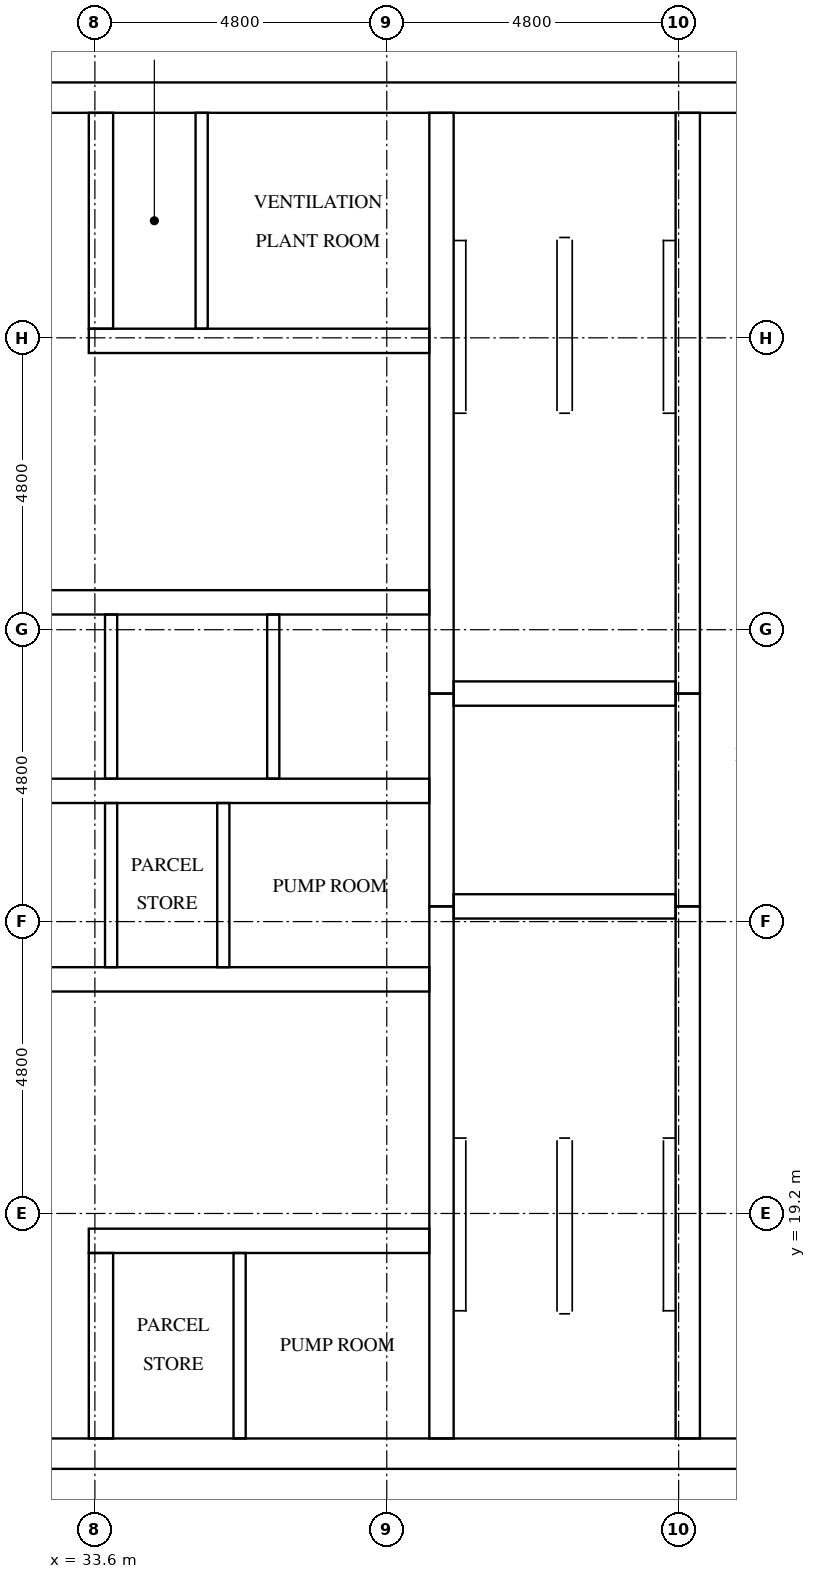
"""IFC4 building model, lengths in metres.
Left out: names, types, materials, properties, quantities, classifications, styles, units other than length and angle.
Written with IfcOpenShell. Run it as: python <this file> out.ifc"""

import sys

from ifc_helpers import new_model, si_unit, direction, frame, frame_2d, origin, place, context, subcontext, project, spatial, rectangle, extrude, element, fill, save


model = new_model("IFC4")
c1 = context("Model", 3, precision=1e-05, world=origin(), true_north=direction((0.0, 1.0)))
c2 = subcontext(c1, "Body", "Model", "MODEL_VIEW")
j1 = project(units=[si_unit("LENGTHUNIT", "METRE"), si_unit("PLANEANGLEUNIT", "RADIAN")], contexts=[c1])
p1 = place(None, origin())
s1 = spatial("IfcSite", under=j1, at=p1, CompositionType="ELEMENT")
p2 = place(p1, origin())
s2 = spatial("IfcBuilding", under=s1, at=p2, CompositionType="ELEMENT")
p3 = place(p2, frame((0.0, 0.0, 268.6)))
s3 = spatial("IfcBuildingStorey", under=s2, at=p3, CompositionType="ELEMENT", Elevation=268.6)
p4 = place(p3, frame((15.0, 15.25, 0.0), z_axis=(0.0, 0.0, 1.0), x_axis=(1.0, 0.0, 0.0)))
e1 = element("IfcWall", 1, at=p4, inside=s3, PredefinedType="SHEAR", context=c2, shape_type="SweptSolid", body=[
    extrude(rectangle(XDim=32.4, YDim=0.5, at=frame_2d((16.2, 0.0))), origin(), (0.0, 0.0, 1.0), 3.2),
])
p5 = place(p4, frame((15.3, 0.0, 0.0)))
e2 = element("IfcOpeningElement", 2, at=p5, cuts=e1, PredefinedType="OPENING", context=c2, shape_type="SweptSolid", body=[
    extrude(rectangle(XDim=1.8, YDim=2.1, at=frame_2d((0.9, 1.05))), frame((0.0, 0.26, 0.0), z_axis=(0.0, -1.0, 0.0), x_axis=(1.0, 0.0, 0.0)), (0.0, 0.0, 1.0), 0.52),
])
p6 = place(p3, frame((15.0, 37.55, 0.0), z_axis=(0.0, 0.0, 1.0), x_axis=(1.0, 0.0, 0.0)))
e3 = element("IfcWall", 3, at=p6, inside=s3, PredefinedType="SHEAR", context=c2, shape_type="SweptSolid", body=[
    extrude(rectangle(XDim=32.4, YDim=0.5, at=frame_2d((16.2, 0.0))), origin(), (0.0, 0.0, 1.0), 3.2),
])
p7 = place(p6, frame((15.3, 0.0, 0.0)))
e4 = element("IfcOpeningElement", 4, at=p7, cuts=e3, PredefinedType="OPENING", context=c2, shape_type="SweptSolid", body=[
    extrude(rectangle(XDim=1.8, YDim=2.1, at=frame_2d((0.9, 1.05))), frame((0.0, 0.26, 0.0), z_axis=(0.0, -1.0, 0.0), x_axis=(1.0, 0.0, 0.0)), (0.0, 0.0, 1.0), 0.52),
])
p8 = place(p6, frame((1.282, 0.0, 0.0)))
e5 = element("IfcOpeningElement", 5, at=p8, cuts=e3, PredefinedType="OPENING", context=c2, shape_type="SweptSolid", body=[
    extrude(rectangle(XDim=1.0, YDim=2.1, at=frame_2d((0.5, 1.05))), frame((0.0, 0.26, 0.0), z_axis=(0.0, -1.0, 0.0), x_axis=(1.0, 0.0, 0.0)), (0.0, 0.0, 1.0), 0.52),
])
p9 = place(p6, frame((5.082, 0.0, 0.0)))
e6 = element("IfcOpeningElement", 6, at=p9, cuts=e3, PredefinedType="OPENING", context=c2, shape_type="SweptSolid", body=[
    extrude(rectangle(XDim=1.0, YDim=2.1, at=frame_2d((0.5, 1.05))), frame((0.0, 0.26, 0.0), z_axis=(0.0, -1.0, 0.0), x_axis=(1.0, 0.0, 0.0)), (0.0, 0.0, 1.0), 0.52),
])
p10 = place(p3, frame((39.3, 15.5, 0.0), z_axis=(0.0, 0.0, 1.0), x_axis=(0.0, 1.0, 0.0)))
e7 = element("IfcWall", 7, at=p10, inside=s3, PredefinedType="SHEAR", context=c2, shape_type="SweptSolid", body=[
    extrude(rectangle(XDim=8.75, YDim=0.4, at=frame_2d((4.375, 0.0))), origin(), (0.0, 0.0, 1.0), 3.2),
])
p11 = place(p3, frame((39.3, 24.25, 0.0), z_axis=(0.0, 0.0, 1.0), x_axis=(0.0, 1.0, 0.0)))
e8 = element("IfcWall", 8, at=p11, inside=s3, PredefinedType="SHEAR", context=c2, shape_type="SweptSolid", body=[
    extrude(rectangle(XDim=3.5, YDim=0.4, at=frame_2d((1.75, 0.0))), origin(), (0.0, 0.0, 1.0), 3.2),
])
p12 = place(p3, frame((39.3, 27.75, 0.0), z_axis=(0.0, 0.0, 1.0), x_axis=(0.0, 1.0, 0.0)))
e9 = element("IfcWall", 9, at=p12, inside=s3, PredefinedType="SHEAR", context=c2, shape_type="SweptSolid", body=[
    extrude(rectangle(XDim=9.55, YDim=0.4, at=frame_2d((4.775, 0.0))), origin(), (0.0, 0.0, 1.0), 3.2),
])
p13 = place(p3, frame((43.35, 15.5, 0.0), z_axis=(0.0, 0.0, 1.0), x_axis=(0.0, 1.0, 0.0)))
e10 = element("IfcWall", 10, at=p13, inside=s3, PredefinedType="SHEAR", context=c2, shape_type="SweptSolid", body=[
    extrude(rectangle(XDim=8.75, YDim=0.4, at=frame_2d((4.375, 0.0))), origin(), (0.0, 0.0, 1.0), 3.2),
])
p14 = place(p13, frame((0.7, 0.0, 0.0)))
e11 = element("IfcOpeningElement", 11, at=p14, cuts=e10, PredefinedType="OPENING", context=c2, shape_type="SweptSolid", body=[
    extrude(rectangle(XDim=1.2, YDim=2.1, at=frame_2d((0.6, 1.05))), frame((0.0, 0.21, 0.0), z_axis=(0.0, -1.0, 0.0), x_axis=(1.0, 0.0, 0.0)), (0.0, 0.0, 1.0), 0.42),
])
p15 = place(p3, frame((43.35, 24.25, 0.0), z_axis=(0.0, 0.0, 1.0), x_axis=(0.0, 1.0, 0.0)))
e12 = element("IfcWall", 12, at=p15, inside=s3, PredefinedType="SHEAR", context=c2, shape_type="SweptSolid", body=[
    extrude(rectangle(XDim=3.5, YDim=0.4, at=frame_2d((1.75, 0.0))), origin(), (0.0, 0.0, 1.0), 3.2),
])
p16 = place(p15, frame((1.2, 0.0, 0.0)))
e13 = element("IfcOpeningElement", 13, at=p16, cuts=e12, PredefinedType="OPENING", context=c2, shape_type="SweptSolid", body=[
    extrude(rectangle(XDim=1.1, YDim=2.1, at=frame_2d((0.55, 1.05))), frame((0.0, 0.21, 0.0), z_axis=(0.0, -1.0, 0.0), x_axis=(1.0, 0.0, 0.0)), (0.0, 0.0, 1.0), 0.42),
])
p17 = place(p3, frame((43.35, 27.75, 0.0), z_axis=(0.0, 0.0, 1.0), x_axis=(0.0, 1.0, 0.0)))
e14 = element("IfcWall", 14, at=p17, inside=s3, PredefinedType="SHEAR", context=c2, shape_type="SweptSolid", body=[
    extrude(rectangle(XDim=9.55, YDim=0.4, at=frame_2d((4.775, 0.0))), origin(), (0.0, 0.0, 1.0), 3.2),
])
p18 = place(p17, frame((7.65, 0.0, 0.0)))
e15 = element("IfcOpeningElement", 15, at=p18, cuts=e14, PredefinedType="OPENING", context=c2, shape_type="SweptSolid", body=[
    extrude(rectangle(XDim=1.2, YDim=2.1, at=frame_2d((0.6, 1.05))), frame((0.0, 0.21, 0.0), z_axis=(0.0, -1.0, 0.0), x_axis=(1.0, 0.0, 0.0)), (0.0, 0.0, 1.0), 0.42),
])
for number, where, z_axis, x_axis in (
    (16, (39.5, 24.25, 0.0), (0.0, 0.0, 1.0), (1.0, 0.0, 0.0)),
    (17, (39.5, 27.75, 0.0), (0.0, 0.0, 1.0), (1.0, 0.0, 0.0)),
):
    element("IfcWall", number, at=place(p3, frame(where, z_axis=z_axis, x_axis=x_axis)), inside=s3, PredefinedType="SHEAR", context=c2, shape_type="SweptSolid", body=[
        extrude(rectangle(XDim=3.65, YDim=0.4, at=frame_2d((1.825, 0.0))), origin(), (0.0, 0.0, 1.0), 3.2),
    ])
p19 = place(p3, frame((33.5, 18.75, 0.0), z_axis=(0.0, 0.0, 1.0), x_axis=(1.0, 0.0, 0.0)))
e18 = element("IfcWall", 18, at=p19, inside=s3, PredefinedType="SHEAR", context=c2, shape_type="SweptSolid", body=[
    extrude(rectangle(XDim=5.6, YDim=0.4, at=frame_2d((2.8, 0.0))), origin(), (0.0, 0.0, 1.0), 3.2),
])
p20 = place(p19, frame((0.89, 0.0, 0.0)))
e19 = element("IfcOpeningElement", 19, at=p20, cuts=e18, PredefinedType="OPENING", context=c2, shape_type="SweptSolid", body=[
    extrude(rectangle(XDim=1.0, YDim=2.1, at=frame_2d((0.5, 1.05))), frame((0.0, 0.21, 0.0), z_axis=(0.0, -1.0, 0.0), x_axis=(1.0, 0.0, 0.0)), (0.0, 0.0, 1.0), 0.42),
])
p21 = place(p19, frame((3.59, 0.0, 0.0)))
e20 = element("IfcOpeningElement", 20, at=p21, cuts=e18, PredefinedType="OPENING", context=c2, shape_type="SweptSolid", body=[
    extrude(rectangle(XDim=1.0, YDim=2.1, at=frame_2d((0.5, 1.05))), frame((0.0, 0.21, 0.0), z_axis=(0.0, -1.0, 0.0), x_axis=(1.0, 0.0, 0.0)), (0.0, 0.0, 1.0), 0.42),
])
p22 = place(p3, frame((23.3, 23.05, 0.0), z_axis=(0.0, 0.0, 1.0), x_axis=(1.0, 0.0, 0.0)))
e21 = element("IfcWall", 21, at=p22, inside=s3, PredefinedType="SHEAR", context=c2, shape_type="SweptSolid", body=[
    extrude(rectangle(XDim=15.8, YDim=0.4, at=frame_2d((7.9, 0.0))), origin(), (0.0, 0.0, 1.0), 3.2),
])
p23 = place(p22, frame((0.323, 0.0, 0.0)))
e22 = element("IfcOpeningElement", 22, at=p23, cuts=e21, PredefinedType="OPENING", context=c2, shape_type="SweptSolid", body=[
    extrude(rectangle(XDim=1.0, YDim=2.1, at=frame_2d((0.5, 1.05))), frame((0.0, 0.21, 0.0), z_axis=(0.0, -1.0, 0.0), x_axis=(1.0, 0.0, 0.0)), (0.0, 0.0, 1.0), 0.42),
])
p24 = place(p22, frame((2.989, 0.0, 0.0)))
e23 = element("IfcOpeningElement", 23, at=p24, cuts=e21, PredefinedType="OPENING", context=c2, shape_type="SweptSolid", body=[
    extrude(rectangle(XDim=1.0, YDim=2.1, at=frame_2d((0.5, 1.05))), frame((0.0, 0.21, 0.0), z_axis=(0.0, -1.0, 0.0), x_axis=(1.0, 0.0, 0.0)), (0.0, 0.0, 1.0), 0.42),
])
p25 = place(p22, frame((10.989, 0.0, 0.0)))
e24 = element("IfcOpeningElement", 24, at=p25, cuts=e21, PredefinedType="OPENING", context=c2, shape_type="SweptSolid", body=[
    extrude(rectangle(XDim=1.0, YDim=2.1, at=frame_2d((0.5, 1.05))), frame((0.0, 0.21, 0.0), z_axis=(0.0, -1.0, 0.0), x_axis=(1.0, 0.0, 0.0)), (0.0, 0.0, 1.0), 0.42),
])
p26 = place(p22, frame((13.656, 0.0, 0.0)))
e25 = element("IfcOpeningElement", 25, at=p26, cuts=e21, PredefinedType="OPENING", context=c2, shape_type="SweptSolid", body=[
    extrude(rectangle(XDim=1.0, YDim=2.1, at=frame_2d((0.5, 1.05))), frame((0.0, 0.21, 0.0), z_axis=(0.0, -1.0, 0.0), x_axis=(1.0, 0.0, 0.0)), (0.0, 0.0, 1.0), 0.42),
])
p27 = place(p3, frame((23.3, 26.15, 0.0), z_axis=(0.0, 0.0, 1.0), x_axis=(1.0, 0.0, 0.0)))
e26 = element("IfcWall", 26, at=p27, inside=s3, PredefinedType="SHEAR", context=c2, shape_type="SweptSolid", body=[
    extrude(rectangle(XDim=15.8, YDim=0.4, at=frame_2d((7.9, 0.0))), origin(), (0.0, 0.0, 1.0), 3.2),
])
p28 = place(p3, frame((23.3, 29.25, 0.0), z_axis=(0.0, 0.0, 1.0), x_axis=(1.0, 0.0, 0.0)))
e27 = element("IfcWall", 27, at=p28, inside=s3, PredefinedType="SHEAR", context=c2, shape_type="SweptSolid", body=[
    extrude(rectangle(XDim=15.8, YDim=0.4, at=frame_2d((7.9, 0.0))), origin(), (0.0, 0.0, 1.0), 3.2),
])
p29 = place(p28, frame((0.683, 0.0, 0.0)))
e28 = element("IfcOpeningElement", 28, at=p29, cuts=e27, PredefinedType="OPENING", context=c2, shape_type="SweptSolid", body=[
    extrude(rectangle(XDim=1.1, YDim=2.1, at=frame_2d((0.55, 1.05))), frame((0.0, 0.21, 0.0), z_axis=(0.0, -1.0, 0.0), x_axis=(1.0, 0.0, 0.0)), (0.0, 0.0, 1.0), 0.42),
])
p30 = place(p28, frame((3.35, 0.0, 0.0)))
e29 = element("IfcOpeningElement", 29, at=p30, cuts=e27, PredefinedType="OPENING", context=c2, shape_type="SweptSolid", body=[
    extrude(rectangle(XDim=1.1, YDim=2.1, at=frame_2d((0.55, 1.05))), frame((0.0, 0.21, 0.0), z_axis=(0.0, -1.0, 0.0), x_axis=(1.0, 0.0, 0.0)), (0.0, 0.0, 1.0), 0.42),
])
p31 = place(p28, frame((6.017, 0.0, 0.0)))
e30 = element("IfcOpeningElement", 30, at=p31, cuts=e27, PredefinedType="OPENING", context=c2, shape_type="SweptSolid", body=[
    extrude(rectangle(XDim=1.1, YDim=2.1, at=frame_2d((0.55, 1.05))), frame((0.0, 0.21, 0.0), z_axis=(0.0, -1.0, 0.0), x_axis=(1.0, 0.0, 0.0)), (0.0, 0.0, 1.0), 0.42),
])
p32 = place(p28, frame((8.683, 0.0, 0.0)))
e31 = element("IfcOpeningElement", 31, at=p32, cuts=e27, PredefinedType="OPENING", context=c2, shape_type="SweptSolid", body=[
    extrude(rectangle(XDim=1.1, YDim=2.1, at=frame_2d((0.55, 1.05))), frame((0.0, 0.21, 0.0), z_axis=(0.0, -1.0, 0.0), x_axis=(1.0, 0.0, 0.0)), (0.0, 0.0, 1.0), 0.42),
])
p33 = place(p28, frame((11.35, 0.0, 0.0)))
e32 = element("IfcOpeningElement", 32, at=p33, cuts=e27, PredefinedType="OPENING", context=c2, shape_type="SweptSolid", body=[
    extrude(rectangle(XDim=1.1, YDim=2.1, at=frame_2d((0.55, 1.05))), frame((0.0, 0.21, 0.0), z_axis=(0.0, -1.0, 0.0), x_axis=(1.0, 0.0, 0.0)), (0.0, 0.0, 1.0), 0.42),
])
p34 = place(p28, frame((14.017, 0.0, 0.0)))
e33 = element("IfcOpeningElement", 33, at=p34, cuts=e27, PredefinedType="OPENING", context=c2, shape_type="SweptSolid", body=[
    extrude(rectangle(XDim=1.1, YDim=2.1, at=frame_2d((0.55, 1.05))), frame((0.0, 0.21, 0.0), z_axis=(0.0, -1.0, 0.0), x_axis=(1.0, 0.0, 0.0)), (0.0, 0.0, 1.0), 0.42),
])
p35 = place(p3, frame((33.5, 33.55, 0.0), z_axis=(0.0, 0.0, 1.0), x_axis=(1.0, 0.0, 0.0)))
e34 = element("IfcWall", 34, at=p35, inside=s3, PredefinedType="SHEAR", context=c2, shape_type="SweptSolid", body=[
    extrude(rectangle(XDim=5.6, YDim=0.4, at=frame_2d((2.8, 0.0))), origin(), (0.0, 0.0, 1.0), 3.2),
])
p36 = place(p35, frame((0.578, 0.0, 0.0)))
e35 = element("IfcOpeningElement", 35, at=p36, cuts=e34, PredefinedType="OPENING", context=c2, shape_type="SweptSolid", body=[
    extrude(rectangle(XDim=1.0, YDim=2.1, at=frame_2d((0.5, 1.05))), frame((0.0, 0.21, 0.0), z_axis=(0.0, -1.0, 0.0), x_axis=(1.0, 0.0, 0.0)), (0.0, 0.0, 1.0), 0.42),
])
p37 = place(p35, frame((3.278, 0.0, 0.0)))
e36 = element("IfcOpeningElement", 36, at=p37, cuts=e34, PredefinedType="OPENING", context=c2, shape_type="SweptSolid", body=[
    extrude(rectangle(XDim=1.0, YDim=2.1, at=frame_2d((0.5, 1.05))), frame((0.0, 0.21, 0.0), z_axis=(0.0, -1.0, 0.0), x_axis=(1.0, 0.0, 0.0)), (0.0, 0.0, 1.0), 0.42),
])
p38 = place(p3, frame((33.7, 15.5, 0.0), z_axis=(0.0, 0.0, 1.0), x_axis=(0.0, 1.0, 0.0)))
e37 = element("IfcWall", 37, at=p38, inside=s3, PredefinedType="SHEAR", context=c2, shape_type="SweptSolid", body=[
    extrude(rectangle(XDim=3.05, YDim=0.4, at=frame_2d((1.525, 0.0))), origin(), (0.0, 0.0, 1.0), 3.2),
])
p39 = place(p3, frame((33.7, 33.75, 0.0), z_axis=(0.0, 0.0, 1.0), x_axis=(0.0, 1.0, 0.0)))
e38 = element("IfcWall", 38, at=p39, inside=s3, PredefinedType="SHEAR", context=c2, shape_type="SweptSolid", body=[
    extrude(rectangle(XDim=3.55, YDim=0.4, at=frame_2d((1.775, 0.0))), origin(), (0.0, 0.0, 1.0), 3.2),
])
for number, where, z_axis, x_axis in (
    (39, (33.867, 23.25, 0.0), (0.0, 0.0, 1.0), (0.0, 1.0, 0.0)),
    (40, (33.867, 26.35, 0.0), (0.0, 0.0, 1.0), (0.0, 1.0, 0.0)),
    (41, (36.533, 26.35, 0.0), (0.0, 0.0, 1.0), (0.0, 1.0, 0.0)),
):
    element("IfcWall", number, at=place(p3, frame(where, z_axis=z_axis, x_axis=x_axis)), inside=s3, PredefinedType="SOLIDWALL", context=c2, shape_type="SweptSolid", body=[
        extrude(rectangle(XDim=2.7, YDim=0.2, at=frame_2d((1.35, 0.0))), origin(), (0.0, 0.0, 1.0), 3.2),
    ])
p40 = place(p3, frame((35.712, 23.25, 0.0), z_axis=(0.0, 0.0, 1.0), x_axis=(0.0, 1.0, 0.0)))
e42 = element("IfcWall", 42, at=p40, inside=s3, PredefinedType="PARTITIONING", context=c2, shape_type="SweptSolid", body=[
    extrude(rectangle(XDim=2.7, YDim=0.2, at=frame_2d((1.35, 0.0))), origin(), (0.0, 0.0, 1.0), 3.2),
])
p41 = place(p3, frame((35.98, 15.5, 0.0), z_axis=(0.0, 0.0, 1.0), x_axis=(0.0, 1.0, 0.0)))
e43 = element("IfcWall", 43, at=p41, inside=s3, PredefinedType="PARTITIONING", context=c2, shape_type="SweptSolid", body=[
    extrude(rectangle(XDim=3.05, YDim=0.2, at=frame_2d((1.525, 0.0))), origin(), (0.0, 0.0, 1.0), 3.2),
])
p42 = place(p3, frame((35.356, 33.75, 0.0), z_axis=(0.0, 0.0, 1.0), x_axis=(0.0, 1.0, 0.0)))
e44 = element("IfcWall", 44, at=p42, inside=s3, PredefinedType="PARTITIONING", context=c2, shape_type="SweptSolid", body=[
    extrude(rectangle(XDim=3.55, YDim=0.2, at=frame_2d((1.775, 0.0))), origin(), (0.0, 0.0, 1.0), 3.2),
])
p43 = place(p32, origin())
e45 = element("IfcDoor", 45, at=p43, inside=s3, OperationType="DOUBLE_DOOR_SLIDING", PredefinedType="DOOR", context=c2, shape_type="SweptSolid", body=[
    extrude(rectangle(XDim=1.1, YDim=2.1, at=frame_2d((0.55, 1.05))), frame((0.0, 0.025, 0.0), z_axis=(0.0, -1.0, 0.0), x_axis=(1.0, 0.0, 0.0)), (0.0, 0.0, 1.0), 0.05),
])
fill(e31, e45)
p44 = place(p33, origin())
e46 = element("IfcDoor", 46, at=p44, inside=s3, OperationType="DOUBLE_DOOR_SLIDING", PredefinedType="DOOR", context=c2, shape_type="SweptSolid", body=[
    extrude(rectangle(XDim=1.1, YDim=2.1, at=frame_2d((0.55, 1.05))), frame((0.0, 0.025, 0.0), z_axis=(0.0, -1.0, 0.0), x_axis=(1.0, 0.0, 0.0)), (0.0, 0.0, 1.0), 0.05),
])
fill(e32, e46)
p45 = place(p34, origin())
e47 = element("IfcDoor", 47, at=p45, inside=s3, OperationType="DOUBLE_DOOR_SLIDING", PredefinedType="DOOR", context=c2, shape_type="SweptSolid", body=[
    extrude(rectangle(XDim=1.1, YDim=2.1, at=frame_2d((0.55, 1.05))), frame((0.0, 0.025, 0.0), z_axis=(0.0, -1.0, 0.0), x_axis=(1.0, 0.0, 0.0)), (0.0, 0.0, 1.0), 0.05),
])
fill(e33, e47)
p46 = place(p16, origin())
e48 = element("IfcDoor", 48, at=p46, inside=s3, OperationType="DOUBLE_DOOR_SLIDING", PredefinedType="DOOR", context=c2, shape_type="SweptSolid", body=[
    extrude(rectangle(XDim=1.1, YDim=2.1, at=frame_2d((0.55, 1.05))), frame((0.0, 0.025, 0.0), z_axis=(0.0, -1.0, 0.0), x_axis=(1.0, 0.0, 0.0)), (0.0, 0.0, 1.0), 0.05),
])
fill(e13, e48)
p47 = place(p14, origin())
e49 = element("IfcDoor", 49, at=p47, inside=s3, OperationType="SINGLE_SWING_LEFT", PredefinedType="DOOR", context=c2, shape_type="SweptSolid", body=[
    extrude(rectangle(XDim=1.2, YDim=2.1, at=frame_2d((0.6, 1.05))), frame((0.0, 0.025, 0.0), z_axis=(0.0, -1.0, 0.0), x_axis=(1.0, 0.0, 0.0)), (0.0, 0.0, 1.0), 0.05),
])
fill(e11, e49)
p48 = place(p18, origin())
e50 = element("IfcDoor", 50, at=p48, inside=s3, OperationType="SINGLE_SWING_RIGHT", PredefinedType="DOOR", context=c2, shape_type="SweptSolid", body=[
    extrude(rectangle(XDim=1.2, YDim=2.1, at=frame_2d((0.6, 1.05))), frame((0.0, 0.025, 0.0), z_axis=(0.0, -1.0, 0.0), x_axis=(1.0, 0.0, 0.0)), (0.0, 0.0, 1.0), 0.05),
])
fill(e15, e50)
p49 = place(p25, frame((1.0, 0.0, 0.0), z_axis=(0.0, 0.0, 1.0), x_axis=(-1.0, 0.0, 0.0)))
e51 = element("IfcDoor", 51, at=p49, inside=s3, OperationType="SINGLE_SWING_LEFT", PredefinedType="DOOR", context=c2, shape_type="SweptSolid", body=[
    extrude(rectangle(XDim=1.0, YDim=2.1, at=frame_2d((0.5, 1.05))), frame((0.0, 0.025, 0.0), z_axis=(0.0, -1.0, 0.0), x_axis=(1.0, 0.0, 0.0)), (0.0, 0.0, 1.0), 0.05),
])
fill(e24, e51)
p50 = place(p26, frame((1.0, 0.0, 0.0), z_axis=(0.0, 0.0, 1.0), x_axis=(-1.0, 0.0, 0.0)))
e52 = element("IfcDoor", 52, at=p50, inside=s3, OperationType="SINGLE_SWING_RIGHT", PredefinedType="DOOR", context=c2, shape_type="SweptSolid", body=[
    extrude(rectangle(XDim=1.0, YDim=2.1, at=frame_2d((0.5, 1.05))), frame((0.0, 0.025, 0.0), z_axis=(0.0, -1.0, 0.0), x_axis=(1.0, 0.0, 0.0)), (0.0, 0.0, 1.0), 0.05),
])
fill(e25, e52)
p51 = place(p20, origin())
e53 = element("IfcDoor", 53, at=p51, inside=s3, OperationType="SINGLE_SWING_LEFT", PredefinedType="DOOR", context=c2, shape_type="SweptSolid", body=[
    extrude(rectangle(XDim=1.0, YDim=2.1, at=frame_2d((0.5, 1.05))), frame((0.0, 0.025, 0.0), z_axis=(0.0, -1.0, 0.0), x_axis=(1.0, 0.0, 0.0)), (0.0, 0.0, 1.0), 0.05),
])
fill(e19, e53)
p52 = place(p21, origin())
e54 = element("IfcDoor", 54, at=p52, inside=s3, OperationType="SINGLE_SWING_RIGHT", PredefinedType="DOOR", context=c2, shape_type="SweptSolid", body=[
    extrude(rectangle(XDim=1.0, YDim=2.1, at=frame_2d((0.5, 1.05))), frame((0.0, 0.025, 0.0), z_axis=(0.0, -1.0, 0.0), x_axis=(1.0, 0.0, 0.0)), (0.0, 0.0, 1.0), 0.05),
])
fill(e20, e54)
p53 = place(p36, frame((1.0, 0.0, 0.0), z_axis=(0.0, 0.0, 1.0), x_axis=(-1.0, 0.0, 0.0)))
e55 = element("IfcDoor", 55, at=p53, inside=s3, OperationType="SINGLE_SWING_LEFT", PredefinedType="DOOR", context=c2, shape_type="SweptSolid", body=[
    extrude(rectangle(XDim=1.0, YDim=2.1, at=frame_2d((0.5, 1.05))), frame((0.0, 0.025, 0.0), z_axis=(0.0, -1.0, 0.0), x_axis=(1.0, 0.0, 0.0)), (0.0, 0.0, 1.0), 0.05),
])
fill(e35, e55)
p54 = place(p37, frame((1.0, 0.0, 0.0), z_axis=(0.0, 0.0, 1.0), x_axis=(-1.0, 0.0, 0.0)))
e56 = element("IfcDoor", 56, at=p54, inside=s3, OperationType="SINGLE_SWING_RIGHT", PredefinedType="DOOR", context=c2, shape_type="SweptSolid", body=[
    extrude(rectangle(XDim=1.0, YDim=2.1, at=frame_2d((0.5, 1.05))), frame((0.0, 0.025, 0.0), z_axis=(0.0, -1.0, 0.0), x_axis=(1.0, 0.0, 0.0)), (0.0, 0.0, 1.0), 0.05),
])
fill(e36, e56)
save(model, sys.argv[1])
